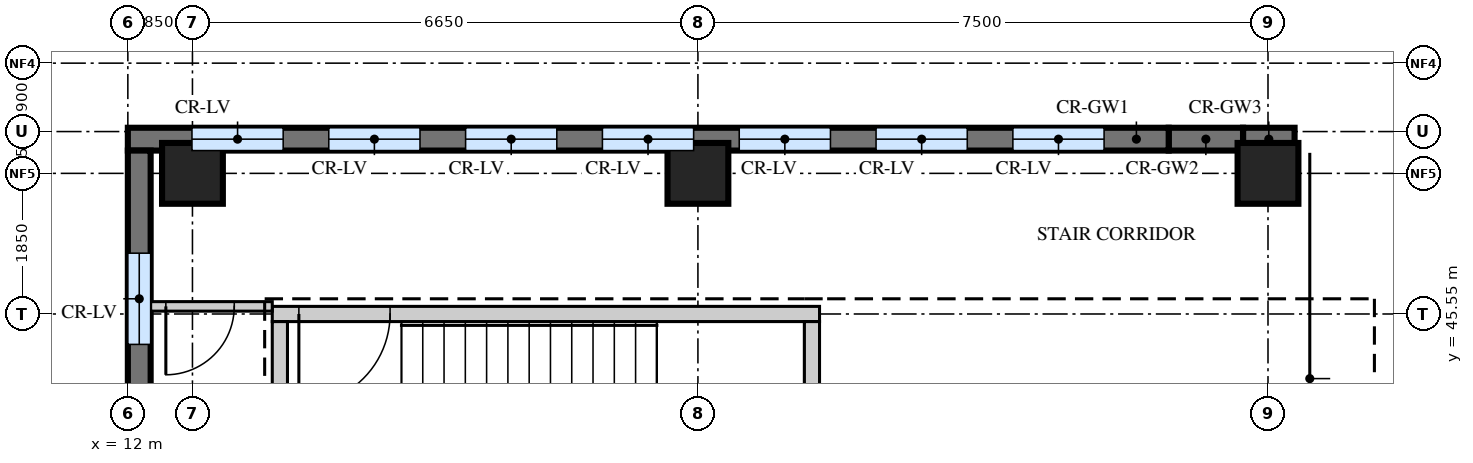
"""IFC4 building model, lengths in metres.
Left out: names, types, materials, properties, quantities, classifications, styles, units other than length and angle.
Written with IfcOpenShell. Run it as: python <this file> out.ifc"""

import sys

from ifc_helpers import new_model, si_unit, direction, frame, frame_2d, origin, origin_2d, place, context, subcontext, project, spatial, rectangle, extrude, source, transform, mapped, element, fill, save


model = new_model("IFC4")
c1 = context("Model", 3, precision=1e-05, world=origin(), true_north=direction((0.0, 1.0)))
c2 = subcontext(c1, "Body", "Model", "MODEL_VIEW")
j1 = project(units=[si_unit("LENGTHUNIT", "METRE"), si_unit("PLANEANGLEUNIT", "RADIAN")], contexts=[c1])
p1 = place(None, origin())
s1 = spatial("IfcSite", under=j1, at=p1, CompositionType="ELEMENT")
p2 = place(p1, origin())
s2 = spatial("IfcBuilding", under=s1, at=p2, CompositionType="ELEMENT")
p3 = place(p2, frame((0.0, 0.0, 348.2)))
s3 = spatial("IfcBuildingStorey", under=s2, at=p3, CompositionType="ELEMENT", Elevation=348.2)
m1 = source(origin(), c2, "Body", "SweptSolid", [
    extrude(rectangle(XDim=7.2, YDim=0.2, at=frame_2d((3.6, 0.0))), origin(), (0.0, 0.0, 1.0), 4.25),
])
p4 = place(p3, frame((13.9, 45.55, 0.0), z_axis=(0.0, 0.0, 1.0), x_axis=(1.0, 0.0, 0.0)))
e1 = element("IfcWall", 1, at=p4, inside=s3, PredefinedType="SHEAR", context=c2, shape_type="MappedRepresentation", body=[
    mapped(m1, transform((0.0, 0.0, 0.0))),
])
m2 = source(origin(), c2, "Body", "SweptSolid", [
    extrude(rectangle(XDim=1.2, YDim=2.1, at=frame_2d((0.6, 1.05))), frame((0.0, 0.11, 0.0), z_axis=(0.0, -1.0, 0.0), x_axis=(1.0, 0.0, 0.0)), (0.0, 0.0, 1.0), 0.22),
])
p5 = place(p4, frame((0.35, 0.0, 0.0)))
e2 = element("IfcOpeningElement", 2, at=p5, cuts=e1, PredefinedType="OPENING", context=c2, shape_type="MappedRepresentation", body=[
    mapped(m2, transform((0.0, 0.0, 0.0))),
])
m3 = source(origin(), c2, "Body", "SweptSolid", [
    extrude(rectangle(XDim=3.35, YDim=0.2, at=frame_2d((1.675, 0.0))), origin(), (0.0, 0.0, 1.0), 4.25),
])
for number, where, z_axis, x_axis in (
    (3, (21.0, 42.1, 0.0), (0.0, 0.0, 1.0), (0.0, 1.0, 0.0)),
    (4, (14.0, 42.1, 0.0), (0.0, 0.0, 1.0), (0.0, 1.0, 0.0)),
):
    element("IfcWall", number, at=place(p3, frame(where, z_axis=z_axis, x_axis=x_axis)), inside=s3, PredefinedType="SHEAR", context=c2, shape_type="MappedRepresentation", body=[
        mapped(m3, transform((0.0, 0.0, 0.0))),
    ])
m4 = source(origin(), c2, "Body", "SweptSolid", [
    extrude(rectangle(XDim=0.8, YDim=0.8, at=origin_2d()), origin(), (0.0, 0.0, 1.0), 4.5),
])
for number, where, z_axis, x_axis in (
    (5, (12.85, 47.4, 0.0), (0.0, 0.0, 1.0), (1.0, 0.0, 0.0)),
    (6, (19.5, 47.4, 0.0), (0.0, 0.0, 1.0), (1.0, 0.0, 0.0)),
):
    element("IfcColumn", number, at=place(p3, frame(where, z_axis=z_axis, x_axis=x_axis)), inside=s3, PredefinedType="COLUMN", context=c2, shape_type="MappedRepresentation", body=[
        mapped(m4, transform((0.0, 0.0, 0.0))),
    ])
m5 = source(origin(), c2, "Body", "SweptSolid", [
    extrude(rectangle(XDim=0.8, YDim=0.8, at=origin_2d()), origin(), (0.0, 0.0, 1.0), 1.802),
])
p6 = place(p3, frame((27.0, 47.4, 0.0), z_axis=(0.0, 0.0, 1.0), x_axis=(1.0, 0.0, 0.0)))
e7 = element("IfcColumn", 7, at=p6, inside=s3, PredefinedType="COLUMN", context=c2, shape_type="MappedRepresentation", body=[
    mapped(m5, transform((0.0, 0.0, 0.0))),
])
m6 = source(origin(), c2, "Body", "SweptSolid", [
    extrude(rectangle(XDim=0.678, YDim=0.3, at=frame_2d((0.339, 0.0))), origin(), (0.0, 0.0, 1.0), 2.3),
])
p7 = place(p3, frame((27.35, 47.85, 0.0), z_axis=(0.0, 0.0, 1.0), x_axis=(-1.0, 0.0, 0.0)))
e8 = element("IfcWall", 8, at=p7, inside=s3, PredefinedType="SOLIDWALL", context=c2, shape_type="MappedRepresentation", body=[
    mapped(m6, transform((0.0, 0.0, 0.0))),
])
m7 = source(origin(), c2, "Body", "SweptSolid", [
    extrude(rectangle(XDim=0.978, YDim=0.3, at=frame_2d((0.489, 0.0))), origin(), (0.0, 0.0, 1.0), 4.05),
])
p8 = place(p3, frame((26.672, 47.85, 0.0), z_axis=(0.0, 0.0, 1.0), x_axis=(-1.0, 0.0, 0.0)))
e9 = element("IfcWall", 9, at=p8, inside=s3, PredefinedType="SOLIDWALL", context=c2, shape_type="MappedRepresentation", body=[
    mapped(m7, transform((0.0, 0.0, 0.0))),
])
m8 = source(origin(), c2, "Body", "SweptSolid", [
    extrude(rectangle(XDim=13.694, YDim=0.3, at=frame_2d((6.847, 0.0))), origin(), (0.0, 0.0, 1.0), 4.5),
])
p9 = place(p3, frame((25.694, 47.85, 0.0), z_axis=(0.0, 0.0, 1.0), x_axis=(-1.0, 0.0, 0.0)))
e10 = element("IfcWall", 10, at=p9, inside=s3, PredefinedType="SOLIDWALL", context=c2, shape_type="MappedRepresentation", body=[
    mapped(m8, transform((0.0, 0.0, 0.0))),
])
m9 = source(origin(), c2, "Body", "SweptSolid", [
    extrude(rectangle(XDim=1.2, YDim=2.4, at=frame_2d((0.6, 1.2))), frame((0.0, 0.16, 0.0), z_axis=(0.0, -1.0, 0.0), x_axis=(1.0, 0.0, 0.0)), (0.0, 0.0, 1.0), 0.32),
])
p10 = place(p9, frame((0.85, 0.0, 0.9)))
e11 = element("IfcOpeningElement", 11, at=p10, cuts=e10, PredefinedType="OPENING", context=c2, shape_type="MappedRepresentation", body=[
    mapped(m9, transform((0.0, 0.0, 0.0))),
])
p11 = place(p9, frame((2.65, 0.0, 0.9)))
e12 = element("IfcOpeningElement", 12, at=p11, cuts=e10, PredefinedType="OPENING", context=c2, shape_type="MappedRepresentation", body=[
    mapped(m9, transform((0.0, 0.0, 0.0))),
])
p12 = place(p9, frame((4.45, 0.0, 0.9)))
e13 = element("IfcOpeningElement", 13, at=p12, cuts=e10, PredefinedType="OPENING", context=c2, shape_type="MappedRepresentation", body=[
    mapped(m9, transform((0.0, 0.0, 0.0))),
])
p13 = place(p9, frame((6.25, 0.0, 0.9)))
e14 = element("IfcOpeningElement", 14, at=p13, cuts=e10, PredefinedType="OPENING", context=c2, shape_type="MappedRepresentation", body=[
    mapped(m9, transform((0.0, 0.0, 0.0))),
])
p14 = place(p9, frame((8.05, 0.0, 0.9)))
e15 = element("IfcOpeningElement", 15, at=p14, cuts=e10, PredefinedType="OPENING", context=c2, shape_type="MappedRepresentation", body=[
    mapped(m9, transform((0.0, 0.0, 0.0))),
])
p15 = place(p9, frame((9.85, 0.0, 0.9)))
e16 = element("IfcOpeningElement", 16, at=p15, cuts=e10, PredefinedType="OPENING", context=c2, shape_type="MappedRepresentation", body=[
    mapped(m9, transform((0.0, 0.0, 0.0))),
])
p16 = place(p9, frame((11.65, 0.0, 0.9)))
e17 = element("IfcOpeningElement", 17, at=p16, cuts=e10, PredefinedType="OPENING", context=c2, shape_type="MappedRepresentation", body=[
    mapped(m9, transform((0.0, 0.0, 0.0))),
])
m10 = source(origin(), c2, "Body", "SweptSolid", [
    extrude(rectangle(XDim=5.7, YDim=0.3, at=frame_2d((2.85, 0.0))), origin(), (0.0, 0.0, 1.0), 4.5),
])
p17 = place(p3, frame((12.15, 47.7, 0.0), z_axis=(0.0, 0.0, 1.0), x_axis=(0.0, -1.0, 0.0)))
e18 = element("IfcWall", 18, at=p17, inside=s3, PredefinedType="SOLIDWALL", context=c2, shape_type="MappedRepresentation", body=[
    mapped(m10, transform((0.0, 0.0, 0.0))),
])
p18 = place(p17, frame((1.35, 0.0, 0.9)))
e19 = element("IfcOpeningElement", 19, at=p18, cuts=e18, PredefinedType="OPENING", context=c2, shape_type="MappedRepresentation", body=[
    mapped(m9, transform((0.0, 0.0, 0.0))),
])
p19 = place(p17, frame((3.15, 0.0, 0.9)))
e20 = element("IfcOpeningElement", 20, at=p19, cuts=e18, PredefinedType="OPENING", context=c2, shape_type="MappedRepresentation", body=[
    mapped(m9, transform((0.0, 0.0, 0.0))),
])
m11 = source(origin(), c2, "Body", "SweptSolid", [
    extrude(rectangle(XDim=1.6, YDim=0.125, at=frame_2d((0.8, 0.0))), origin(), (0.0, 0.0, 1.0), 4.3),
])
p20 = place(p3, frame((12.3, 45.65, 0.0), z_axis=(0.0, 0.0, 1.0), x_axis=(1.0, 0.0, 0.0)))
e21 = element("IfcWall", 21, at=p20, inside=s3, PredefinedType="PARTITIONING", context=c2, shape_type="MappedRepresentation", body=[
    mapped(m11, transform((0.0, 0.0, 0.0))),
])
m12 = source(origin(), c2, "Body", "SweptSolid", [
    extrude(rectangle(XDim=0.9, YDim=2.1, at=frame_2d((0.45, 1.05))), frame((0.0, 0.073, 0.0), z_axis=(0.0, -1.0, 0.0), x_axis=(1.0, 0.0, 0.0)), (0.0, 0.0, 1.0), 0.145),
])
p21 = place(p20, frame((0.2, 0.0, 0.0)))
e22 = element("IfcOpeningElement", 22, at=p21, cuts=e21, PredefinedType="OPENING", context=c2, shape_type="MappedRepresentation", body=[
    mapped(m12, transform((0.0, 0.0, 0.0))),
])
m13 = source(origin(), c2, "Body", "SweptSolid", [
    extrude(rectangle(XDim=1.2, YDim=2.4, at=frame_2d((0.6, 1.2))), frame((0.0, 0.03, 0.0), z_axis=(0.0, -1.0, 0.0), x_axis=(1.0, 0.0, 0.0)), (0.0, 0.0, 1.0), 0.06),
])
p22 = place(p10, origin())
e23 = element("IfcWindow", 23, at=p22, inside=s3, PartitioningType="SINGLE_PANEL", PredefinedType="WINDOW", context=c2, shape_type="MappedRepresentation", body=[
    mapped(m13, transform((0.0, 0.0, 0.0))),
])
fill(e11, e23)
p23 = place(p11, origin())
e24 = element("IfcWindow", 24, at=p23, inside=s3, PartitioningType="SINGLE_PANEL", PredefinedType="WINDOW", context=c2, shape_type="MappedRepresentation", body=[
    mapped(m13, transform((0.0, 0.0, 0.0))),
])
fill(e12, e24)
p24 = place(p12, origin())
e25 = element("IfcWindow", 25, at=p24, inside=s3, PartitioningType="SINGLE_PANEL", PredefinedType="WINDOW", context=c2, shape_type="MappedRepresentation", body=[
    mapped(m13, transform((0.0, 0.0, 0.0))),
])
fill(e13, e25)
p25 = place(p13, origin())
e26 = element("IfcWindow", 26, at=p25, inside=s3, PartitioningType="SINGLE_PANEL", PredefinedType="WINDOW", context=c2, shape_type="MappedRepresentation", body=[
    mapped(m13, transform((0.0, 0.0, 0.0))),
])
fill(e14, e26)
p26 = place(p14, origin())
e27 = element("IfcWindow", 27, at=p26, inside=s3, PartitioningType="SINGLE_PANEL", PredefinedType="WINDOW", context=c2, shape_type="MappedRepresentation", body=[
    mapped(m13, transform((0.0, 0.0, 0.0))),
])
fill(e15, e27)
p27 = place(p15, origin())
e28 = element("IfcWindow", 28, at=p27, inside=s3, PartitioningType="SINGLE_PANEL", PredefinedType="WINDOW", context=c2, shape_type="MappedRepresentation", body=[
    mapped(m13, transform((0.0, 0.0, 0.0))),
])
fill(e16, e28)
p28 = place(p16, origin())
e29 = element("IfcWindow", 29, at=p28, inside=s3, PartitioningType="SINGLE_PANEL", PredefinedType="WINDOW", context=c2, shape_type="MappedRepresentation", body=[
    mapped(m13, transform((0.0, 0.0, 0.0))),
])
fill(e17, e29)
p29 = place(p18, origin())
e30 = element("IfcWindow", 30, at=p29, inside=s3, PartitioningType="SINGLE_PANEL", PredefinedType="WINDOW", context=c2, shape_type="MappedRepresentation", body=[
    mapped(m13, transform((0.0, 0.0, 0.0))),
])
fill(e19, e30)
m14 = source(origin(), c2, "Body", "SweptSolid", [
    extrude(rectangle(XDim=0.9, YDim=2.1, at=frame_2d((0.45, 1.05))), frame((0.0, 0.025, 0.0), z_axis=(0.0, -1.0, 0.0), x_axis=(1.0, 0.0, 0.0)), (0.0, 0.0, 1.0), 0.05),
])
p30 = place(p21, origin())
e31 = element("IfcDoor", 31, at=p30, inside=s3, OperationType="SINGLE_SWING_LEFT", PredefinedType="DOOR", context=c2, shape_type="MappedRepresentation", body=[
    mapped(m14, transform((0.0, 0.0, 0.0))),
])
fill(e22, e31)
m15 = source(origin(), c2, "Body", "SweptSolid", [
    extrude(rectangle(XDim=1.2, YDim=2.1, at=frame_2d((0.6, 1.05))), frame((0.0, 0.025, 0.0), z_axis=(0.0, -1.0, 0.0), x_axis=(1.0, 0.0, 0.0)), (0.0, 0.0, 1.0), 0.05),
])
p31 = place(p5, origin())
e32 = element("IfcDoor", 32, at=p31, inside=s3, OperationType="SINGLE_SWING_LEFT", PredefinedType="DOOR", context=c2, shape_type="MappedRepresentation", body=[
    mapped(m15, transform((0.0, 0.0, 0.0))),
])
fill(e2, e32)
save(model, sys.argv[1])
